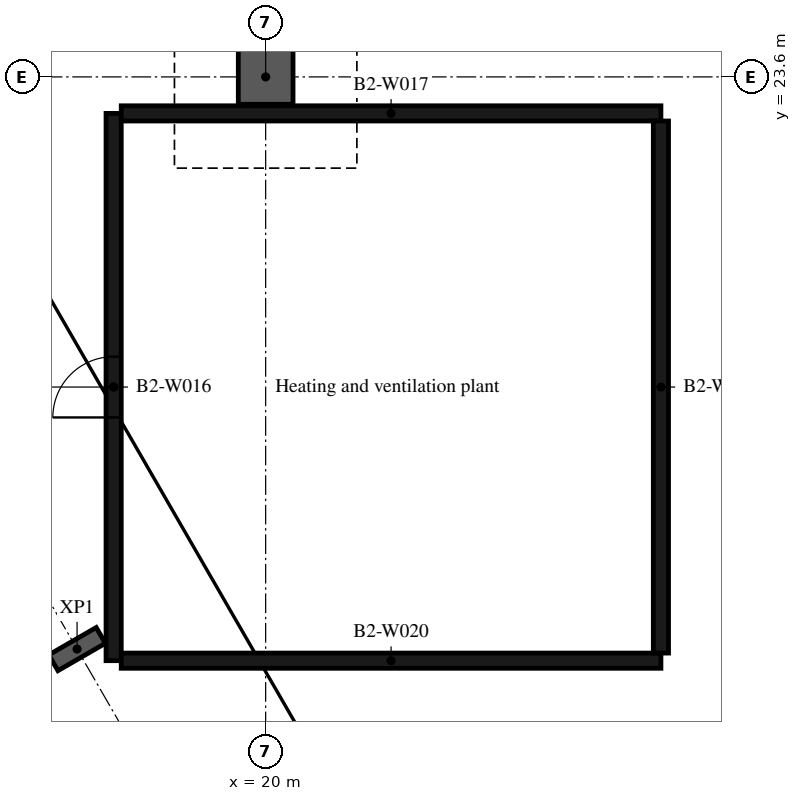
"""IFC4 building model, lengths in metres.
Left out: names, types, materials, properties, quantities, classifications, styles, units other than length and angle.
Written with IfcOpenShell. Run it as: python <this file> out.ifc"""

import sys

from ifc_helpers import new_model, si_unit, direction, frame, frame_2d, origin, origin_2d, place, context, subcontext, project, spatial, rectangle, i_section, extrude, element, fill, save


model = new_model("IFC4")
c1 = context("Model", 3, precision=1e-05, world=origin(), true_north=direction((0.0, 1.0)))
c2 = subcontext(c1, "Body", "Model", "MODEL_VIEW")
j1 = project(units=[si_unit("LENGTHUNIT", "METRE"), si_unit("PLANEANGLEUNIT", "RADIAN")], contexts=[c1])
p1 = place(None, origin())
s1 = spatial("IfcSite", under=j1, at=p1, CompositionType="ELEMENT")
p2 = place(p1, origin())
s2 = spatial("IfcBuilding", under=s1, at=p2, CompositionType="ELEMENT")
p3 = place(p2, frame((0.0, 0.0, -8.4)))
s3 = spatial("IfcBuildingStorey", under=s2, at=p3, CompositionType="ELEMENT", Elevation=-8.4)
p4 = place(p3, frame((20.0, 23.6, 0.0), z_axis=(0.0, 0.0, 1.0), x_axis=(1.0, 0.0, 0.0)))
e1 = element("IfcColumn", 1, at=p4, inside=s3, PredefinedType="COLUMN", context=c2, shape_type="SweptSolid", body=[
    extrude(rectangle(XDim=0.9, YDim=0.9, at=origin_2d()), origin(), (0.0, 0.0, 1.0), 3.82),
])
p5 = place(p3, frame((16.899, 14.19, 0.0), z_axis=(0.0, 0.0, 1.0), x_axis=(0.50000017485, -0.866025302835, 0.0)))
e2 = element("IfcColumn", 2, at=p5, inside=s3, PredefinedType="COLUMN", context=c2, shape_type="SweptSolid", body=[
    extrude(i_section(OverallWidth=0.3, OverallDepth=0.9, WebThickness=0.019, FlangeThickness=0.035, FilletRadius=0.03, at=origin_2d()), origin(), (0.0, 0.0, 1.0), 3.82),
])
p6 = place(p3, frame((17.5, 14.0, 0.0), z_axis=(0.0, 0.0, 1.0), x_axis=(0.0, 1.0, 0.0)))
e3 = element("IfcWall", 3, at=p6, inside=s3, PredefinedType="PARTITIONING", context=c2, shape_type="SweptSolid", body=[
    extrude(rectangle(XDim=9.0, YDim=0.25, at=frame_2d((4.5, 0.0))), origin(), (0.0, 0.0, 1.0), 3.82),
])
p7 = place(p6, frame((4.0, 0.0, 0.0)))
e4 = element("IfcOpeningElement", 4, at=p7, cuts=e3, PredefinedType="OPENING", context=c2, shape_type="SweptSolid", body=[
    extrude(rectangle(XDim=1.0, YDim=2.1, at=frame_2d((0.5, 1.05))), frame((0.0, 0.135, 0.0), z_axis=(0.0, -1.0, 0.0), x_axis=(1.0, 0.0, 0.0)), (0.0, 0.0, 1.0), 0.27),
])
for number, where, z_axis, x_axis in (
    (5, (17.625, 23.0, 0.0), (0.0, 0.0, 1.0), (1.0, 0.0, 0.0)),
    (6, (26.5, 14.0, 0.0), (0.0, 0.0, 1.0), (-1.0, 0.0, 0.0)),
):
    element("IfcWall", number, at=place(p3, frame(where, z_axis=z_axis, x_axis=x_axis)), inside=s3, PredefinedType="PARTITIONING", context=c2, shape_type="SweptSolid", body=[
        extrude(rectangle(XDim=8.875, YDim=0.25, at=frame_2d((4.438, 0.0))), origin(), (0.0, 0.0, 1.0), 3.82),
    ])
p8 = place(p3, frame((26.5, 22.875, 0.0), z_axis=(0.0, 0.0, 1.0), x_axis=(0.0, -1.0, 0.0)))
e7 = element("IfcWall", 7, at=p8, inside=s3, PredefinedType="PARTITIONING", context=c2, shape_type="SweptSolid", body=[
    extrude(rectangle(XDim=8.75, YDim=0.25, at=frame_2d((4.375, 0.0))), origin(), (0.0, 0.0, 1.0), 3.82),
])
p9 = place(p7, origin())
e8 = element("IfcDoor", 8, at=p9, inside=s3, OperationType="SINGLE_SWING_LEFT", PredefinedType="DOOR", context=c2, shape_type="SweptSolid", body=[
    extrude(rectangle(XDim=1.0, YDim=2.1, at=frame_2d((0.5, 1.05))), frame((0.0, 0.025, 0.0), z_axis=(0.0, -1.0, 0.0), x_axis=(1.0, 0.0, 0.0)), (0.0, 0.0, 1.0), 0.05),
])
fill(e4, e8)
save(model, sys.argv[1])
